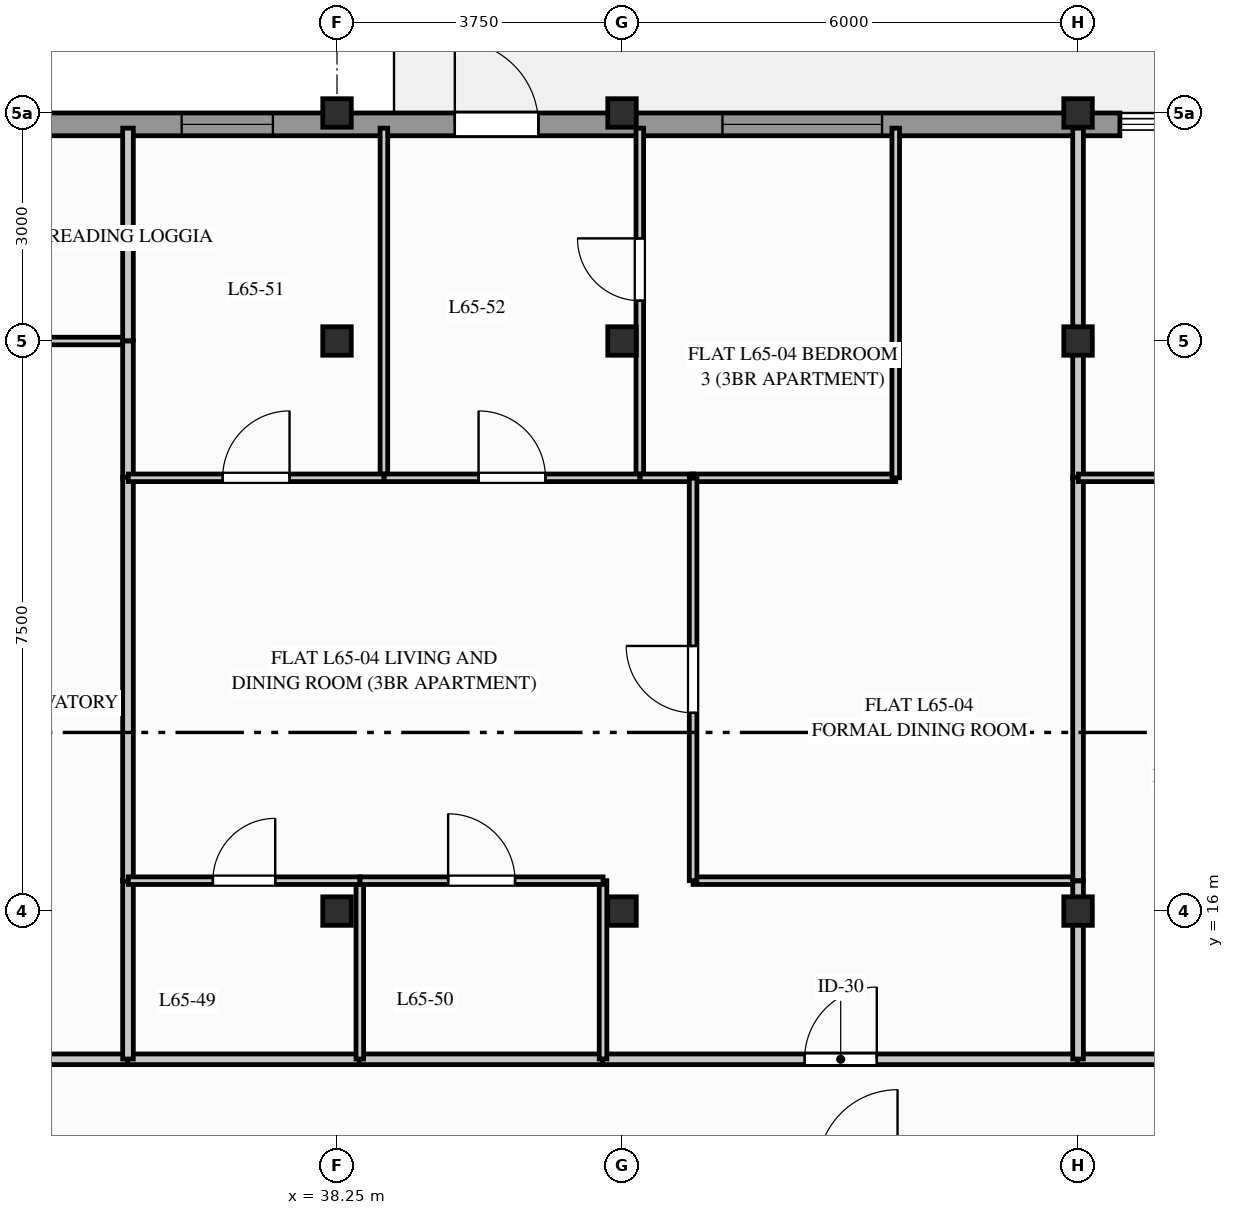
"""IFC4 building model, lengths in metres.
Left out: names, types, materials, properties, quantities, classifications, styles, units other than length and angle.
Written with IfcOpenShell. Run it as: python <this file> out.ifc"""

import sys

from ifc_helpers import new_model, si_unit, direction, frame, frame_2d, origin, origin_2d, place, context, subcontext, project, spatial, rectangle, i_section, extrude, element, fill, save


model = new_model("IFC4")
c1 = context("Model", 3, precision=1e-05, world=origin(), true_north=direction((0.0, 1.0)))
c2 = subcontext(c1, "Body", "Model", "MODEL_VIEW")
j1 = project(units=[si_unit("LENGTHUNIT", "METRE"), si_unit("PLANEANGLEUNIT", "RADIAN")], contexts=[c1])
p1 = place(None, origin())
s1 = spatial("IfcSite", under=j1, at=p1, CompositionType="ELEMENT")
p2 = place(p1, origin())
s2 = spatial("IfcBuilding", under=s1, at=p2, CompositionType="ELEMENT")
p3 = place(p2, frame((0.0, 0.0, 214.4)))
s3 = spatial("IfcBuildingStorey", under=s2, at=p3, CompositionType="ELEMENT", Elevation=214.4)
for number, where, z_axis, x_axis in (
    (1, (38.25, 16.0, 0.0), (0.0, 0.0, 1.0), (1.0, 0.0, 0.0)),
    (2, (38.25, 23.5, 0.0), (0.0, 0.0, 1.0), (1.0, 0.0, 0.0)),
    (3, (38.25, 26.5, 0.0), (0.0, 0.0, 1.0), (1.0, 0.0, 0.0)),
    (4, (42.0, 16.0, 0.0), (0.0, 0.0, 1.0), (1.0, 0.0, 0.0)),
    (5, (42.0, 23.5, 0.0), (0.0, 0.0, 1.0), (1.0, 0.0, 0.0)),
    (6, (42.0, 26.5, 0.0), (0.0, 0.0, 1.0), (1.0, 0.0, 0.0)),
    (7, (48.0, 16.0, 0.0), (0.0, 0.0, 1.0), (1.0, 0.0, 0.0)),
    (8, (48.0, 23.5, 0.0), (0.0, 0.0, 1.0), (1.0, 0.0, 0.0)),
    (9, (48.0, 26.5, 0.0), (0.0, 0.0, 1.0), (1.0, 0.0, 0.0)),
):
    element("IfcColumn", number, at=place(p3, frame(where, z_axis=z_axis, x_axis=x_axis)), inside=s3, PredefinedType="COLUMN", context=c2, shape_type="SweptSolid", body=[
        extrude(i_section(OverallWidth=0.375, OverallDepth=0.375, WebThickness=0.017, FlangeThickness=0.027, FilletRadius=0.015, at=origin_2d()), origin(), (0.0, 0.0, 1.0), 3.6),
    ])
p4 = place(p3, frame((32.2, 26.35, 0.0), z_axis=(0.0, 0.0, 1.0), x_axis=(1.0, 0.0, 0.0)))
e10 = element("IfcWall", 10, at=p4, inside=s3, PredefinedType="STANDARD", context=c2, shape_type="SweptSolid", body=[
    extrude(rectangle(XDim=16.35, YDim=0.3, at=frame_2d((8.175, 0.0))), origin(), (0.0, 0.0, 1.0), 2.454),
])
p5 = place(p4, frame((7.6, 0.0, 0.0)))
e11 = element("IfcOpeningElement", 11, at=p5, cuts=e10, PredefinedType="OPENING", context=c2, shape_type="SweptSolid", body=[
    extrude(rectangle(XDim=1.1, YDim=2.2, at=frame_2d((0.55, 1.1))), frame((0.0, 0.16, 0.0), z_axis=(0.0, -1.0, 0.0), x_axis=(1.0, 0.0, 0.0)), (0.0, 0.0, 1.0), 0.32),
])
p6 = place(p4, frame((11.121, 0.0, 0.284)))
e12 = element("IfcOpeningElement", 12, at=p6, cuts=e10, PredefinedType="OPENING", context=c2, shape_type="SweptSolid", body=[
    extrude(rectangle(XDim=2.1, YDim=1.95, at=frame_2d((1.05, 0.975))), frame((0.0, 0.16, 0.0), z_axis=(0.0, -1.0, 0.0), x_axis=(1.0, 0.0, 0.0)), (0.0, 0.0, 1.0), 0.32),
])
p7 = place(p4, frame((4.006, 0.0, 0.634)))
e13 = element("IfcOpeningElement", 13, at=p7, cuts=e10, PredefinedType="OPENING", context=c2, shape_type="SweptSolid", body=[
    extrude(rectangle(XDim=1.2, YDim=1.6, at=frame_2d((0.6, 0.8))), frame((0.0, 0.16, 0.0), z_axis=(0.0, -1.0, 0.0), x_axis=(1.0, 0.0, 0.0)), (0.0, 0.0, 1.0), 0.32),
])
p8 = place(p3, frame((24.493, 14.05, 0.0), z_axis=(0.0, 0.0, 1.0), x_axis=(1.0, 0.0, 0.0)))
e14 = element("IfcWall", 14, at=p8, inside=s3, PredefinedType="PARTITIONING", context=c2, shape_type="SweptSolid", body=[
    extrude(rectangle(XDim=11.019, YDim=0.14, at=frame_2d((5.509, 0.0))), origin(), (0.0, 0.0, 1.0), 2.685),
])
p9 = place(p8, frame((4.984, 0.0, 0.0)))
e15 = element("IfcOpeningElement", 15, at=p9, cuts=e14, PredefinedType="OPENING", context=c2, shape_type="SweptSolid", body=[
    extrude(rectangle(XDim=1.05, YDim=2.06, at=frame_2d((0.525, 1.03))), frame((0.0, 0.08, 0.0), z_axis=(0.0, -1.0, 0.0), x_axis=(1.0, 0.0, 0.0)), (0.0, 0.0, 1.0), 0.16),
])
p10 = place(p3, frame((35.493, 14.05, 0.0), z_axis=(0.0, 0.0, 1.0), x_axis=(1.0, 0.0, 0.0)))
e16 = element("IfcWall", 16, at=p10, inside=s3, PredefinedType="PARTITIONING", context=c2, shape_type="SweptSolid", body=[
    extrude(rectangle(XDim=3.069, YDim=0.14, at=frame_2d((1.534, 0.0))), origin(), (0.0, 0.0, 1.0), 2.685),
])
p11 = place(p3, frame((38.543, 14.05, 0.0), z_axis=(0.0, 0.0, 1.0), x_axis=(1.0, 0.0, 0.0)))
e17 = element("IfcWall", 17, at=p11, inside=s3, PredefinedType="PARTITIONING", context=c2, shape_type="SweptSolid", body=[
    extrude(rectangle(XDim=3.219, YDim=0.14, at=frame_2d((1.609, 0.0))), origin(), (0.0, 0.0, 1.0), 3.33),
])
p12 = place(p3, frame((41.743, 14.05, 0.0), z_axis=(0.0, 0.0, 1.0), x_axis=(1.0, 0.0, 0.0)))
e18 = element("IfcWall", 18, at=p12, inside=s3, PredefinedType="PARTITIONING", context=c2, shape_type="SweptSolid", body=[
    extrude(rectangle(XDim=6.269, YDim=0.14, at=frame_2d((3.134, 0.0))), origin(), (0.0, 0.0, 1.0), 2.685),
])
p13 = place(p12, frame((2.659, 0.0, 0.0)))
e19 = element("IfcOpeningElement", 19, at=p13, cuts=e18, PredefinedType="OPENING", context=c2, shape_type="SweptSolid", body=[
    extrude(rectangle(XDim=0.95, YDim=2.05, at=frame_2d((0.475, 1.025))), frame((0.0, 0.08, 0.0), z_axis=(0.0, -1.0, 0.0), x_axis=(1.0, 0.0, 0.0)), (0.0, 0.0, 1.0), 0.16),
])
p14 = place(p3, frame((47.993, 14.05, 0.0), z_axis=(0.0, 0.0, 1.0), x_axis=(1.0, 0.0, 0.0)))
e20 = element("IfcWall", 20, at=p14, inside=s3, PredefinedType="PARTITIONING", context=c2, shape_type="SweptSolid", body=[
    extrude(rectangle(XDim=5.565, YDim=0.14, at=frame_2d((2.782, 0.0))), origin(), (0.0, 0.0, 1.0), 2.685),
])
p15 = place(p14, frame((2.307, 0.0, 0.0)))
e21 = element("IfcOpeningElement", 21, at=p15, cuts=e20, PredefinedType="OPENING", context=c2, shape_type="SweptSolid", body=[
    extrude(rectangle(XDim=0.95, YDim=2.05, at=frame_2d((0.475, 1.025))), frame((0.0, 0.08, 0.0), z_axis=(0.0, -1.0, 0.0), x_axis=(1.0, 0.0, 0.0)), (0.0, 0.0, 1.0), 0.16),
])
p16 = place(p3, frame((24.504, 23.5, 0.0), z_axis=(0.0, 0.0, 1.0), x_axis=(1.0, 0.0, 0.0)))
e22 = element("IfcWall", 22, at=p16, inside=s3, PredefinedType="PARTITIONING", context=c2, shape_type="SweptSolid", body=[
    extrude(rectangle(XDim=10.996, YDim=0.1, at=frame_2d((5.498, 0.0))), origin(), (0.0, 0.0, 1.0), 2.454),
])
p17 = place(p16, frame((5.088, 0.0, 0.0)))
e23 = element("IfcOpeningElement", 23, at=p17, cuts=e22, PredefinedType="OPENING", context=c2, shape_type="SweptSolid", body=[
    extrude(rectangle(XDim=0.82, YDim=2.02, at=frame_2d((0.41, 1.01))), frame((0.0, 0.06, 0.0), z_axis=(0.0, -1.0, 0.0), x_axis=(1.0, 0.0, 0.0)), (0.0, 0.0, 1.0), 0.12),
])
p18 = place(p3, frame((35.5, 14.054, 0.0), z_axis=(0.0, 0.0, 1.0), x_axis=(0.0, 1.0, 0.0)))
e24 = element("IfcWall", 24, at=p18, inside=s3, PredefinedType="PARTITIONING", context=c2, shape_type="SweptSolid", body=[
    extrude(rectangle(XDim=2.357, YDim=0.14, at=frame_2d((1.179, 0.0))), origin(), (0.0, 0.0, 1.0), 2.454),
])
p19 = place(p3, frame((35.5, 21.689, 0.0), z_axis=(0.0, 0.0, 1.0), x_axis=(0.0, 1.0, 0.0)))
e25 = element("IfcWall", 25, at=p19, inside=s3, PredefinedType="PARTITIONING", context=c2, shape_type="SweptSolid", body=[
    extrude(rectangle(XDim=1.811, YDim=0.14, at=frame_2d((0.906, 0.0))), origin(), (0.0, 0.0, 1.0), 2.454),
])
p20 = place(p3, frame((35.5, 16.393, 0.0), z_axis=(0.0, 0.0, 1.0), x_axis=(0.0, 1.0, 0.0)))
e26 = element("IfcWall", 26, at=p20, inside=s3, PredefinedType="PARTITIONING", context=c2, shape_type="SweptSolid", body=[
    extrude(rectangle(XDim=5.315, YDim=0.14, at=frame_2d((2.657, 0.0))), origin(), (0.0, 0.0, 1.0), 2.899),
])
p21 = place(p3, frame((35.5, 23.504, 0.0), z_axis=(0.0, 0.0, 1.0), x_axis=(0.0, 1.0, 0.0)))
e27 = element("IfcWall", 27, at=p21, inside=s3, PredefinedType="PARTITIONING", context=c2, shape_type="SweptSolid", body=[
    extrude(rectangle(XDim=2.796, YDim=0.14, at=frame_2d((1.398, 0.0))), origin(), (0.0, 0.0, 1.0), 2.454),
])
p22 = place(p3, frame((38.55, 14.054, 0.0), z_axis=(0.0, 0.0, 1.0), x_axis=(0.0, 1.0, 0.0)))
e28 = element("IfcWall", 28, at=p22, inside=s3, PredefinedType="PARTITIONING", context=c2, shape_type="SweptSolid", body=[
    extrude(rectangle(XDim=2.346, YDim=0.1, at=frame_2d((1.173, 0.0))), origin(), (0.0, 0.0, 1.0), 2.685),
])
p23 = place(p3, frame((35.504, 16.4, 0.0), z_axis=(0.0, 0.0, 1.0), x_axis=(1.0, 0.0, 0.0)))
e29 = element("IfcWall", 29, at=p23, inside=s3, PredefinedType="PARTITIONING", context=c2, shape_type="SweptSolid", body=[
    extrude(rectangle(XDim=3.046, YDim=0.1, at=frame_2d((1.523, 0.0))), origin(), (0.0, 0.0, 1.0), 2.685),
])
p24 = place(p23, frame((1.113, 0.0, 0.0)))
e30 = element("IfcOpeningElement", 30, at=p24, cuts=e29, PredefinedType="OPENING", context=c2, shape_type="SweptSolid", body=[
    extrude(rectangle(XDim=0.82, YDim=2.02, at=frame_2d((0.41, 1.01))), frame((0.0, 0.06, 0.0), z_axis=(0.0, -1.0, 0.0), x_axis=(1.0, 0.0, 0.0)), (0.0, 0.0, 1.0), 0.12),
])
p25 = place(p3, frame((41.75, 14.054, 0.0), z_axis=(0.0, 0.0, 1.0), x_axis=(0.0, 1.0, 0.0)))
e31 = element("IfcWall", 31, at=p25, inside=s3, PredefinedType="PARTITIONING", context=c2, shape_type="SweptSolid", body=[
    extrude(rectangle(XDim=2.346, YDim=0.1, at=frame_2d((1.173, 0.0))), origin(), (0.0, 0.0, 1.0), 2.685),
])
p26 = place(p3, frame((38.554, 16.4, 0.0), z_axis=(0.0, 0.0, 1.0), x_axis=(1.0, 0.0, 0.0)))
e32 = element("IfcWall", 32, at=p26, inside=s3, PredefinedType="PARTITIONING", context=c2, shape_type="SweptSolid", body=[
    extrude(rectangle(XDim=3.196, YDim=0.1, at=frame_2d((1.598, 0.0))), origin(), (0.0, 0.0, 1.0), 3.33),
])
p27 = place(p26, frame((1.158, 0.0, 0.0)))
e33 = element("IfcOpeningElement", 33, at=p27, cuts=e32, PredefinedType="OPENING", context=c2, shape_type="SweptSolid", body=[
    extrude(rectangle(XDim=0.88, YDim=2.04, at=frame_2d((0.44, 1.02))), frame((0.0, 0.06, 0.0), z_axis=(0.0, -1.0, 0.0), x_axis=(1.0, 0.0, 0.0)), (0.0, 0.0, 1.0), 0.12),
])
p28 = place(p3, frame((38.867, 21.7, 0.0), z_axis=(0.0, 0.0, 1.0), x_axis=(0.0, 1.0, 0.0)))
e34 = element("IfcWall", 34, at=p28, inside=s3, PredefinedType="PARTITIONING", context=c2, shape_type="SweptSolid", body=[
    extrude(rectangle(XDim=4.6, YDim=0.1, at=frame_2d((2.3, 0.0))), origin(), (0.0, 0.0, 1.0), 2.685),
])
p29 = place(p3, frame((35.504, 21.7, 0.0), z_axis=(0.0, 0.0, 1.0), x_axis=(1.0, 0.0, 0.0)))
e35 = element("IfcWall", 35, at=p29, inside=s3, PredefinedType="PARTITIONING", context=c2, shape_type="SweptSolid", body=[
    extrude(rectangle(XDim=3.363, YDim=0.1, at=frame_2d((1.682, 0.0))), origin(), (0.0, 0.0, 1.0), 2.685),
])
p30 = place(p29, frame((1.241, 0.0, 0.0)))
e36 = element("IfcOpeningElement", 36, at=p30, cuts=e35, PredefinedType="OPENING", context=c2, shape_type="SweptSolid", body=[
    extrude(rectangle(XDim=0.88, YDim=2.04, at=frame_2d((0.44, 1.02))), frame((0.0, 0.06, 0.0), z_axis=(0.0, -1.0, 0.0), x_axis=(1.0, 0.0, 0.0)), (0.0, 0.0, 1.0), 0.12),
])
p31 = place(p3, frame((42.234, 21.7, 0.0), z_axis=(0.0, 0.0, 1.0), x_axis=(0.0, 1.0, 0.0)))
e37 = element("IfcWall", 37, at=p31, inside=s3, PredefinedType="PARTITIONING", context=c2, shape_type="SweptSolid", body=[
    extrude(rectangle(XDim=4.6, YDim=0.1, at=frame_2d((2.3, 0.0))), origin(), (0.0, 0.0, 1.0), 2.685),
])
p32 = place(p31, frame((2.33, 0.0, 0.0)))
e38 = element("IfcOpeningElement", 38, at=p32, cuts=e37, PredefinedType="OPENING", context=c2, shape_type="SweptSolid", body=[
    extrude(rectangle(XDim=0.82, YDim=2.02, at=frame_2d((0.41, 1.01))), frame((0.0, 0.06, 0.0), z_axis=(0.0, -1.0, 0.0), x_axis=(1.0, 0.0, 0.0)), (0.0, 0.0, 1.0), 0.12),
])
p33 = place(p3, frame((38.871, 21.7, 0.0), z_axis=(0.0, 0.0, 1.0), x_axis=(1.0, 0.0, 0.0)))
e39 = element("IfcWall", 39, at=p33, inside=s3, PredefinedType="PARTITIONING", context=c2, shape_type="SweptSolid", body=[
    extrude(rectangle(XDim=3.363, YDim=0.1, at=frame_2d((1.681, 0.0))), origin(), (0.0, 0.0, 1.0), 2.685),
])
p34 = place(p33, frame((1.241, 0.0, 0.0)))
e40 = element("IfcOpeningElement", 40, at=p34, cuts=e39, PredefinedType="OPENING", context=c2, shape_type="SweptSolid", body=[
    extrude(rectangle(XDim=0.88, YDim=2.04, at=frame_2d((0.44, 1.02))), frame((0.0, 0.06, 0.0), z_axis=(0.0, -1.0, 0.0), x_axis=(1.0, 0.0, 0.0)), (0.0, 0.0, 1.0), 0.12),
])
p35 = place(p3, frame((42.924, 21.7, 0.0), z_axis=(0.0, 0.0, 1.0), x_axis=(1.0, 0.0, 0.0)))
e41 = element("IfcWall", 41, at=p35, inside=s3, PredefinedType="PARTITIONING", context=c2, shape_type="SweptSolid", body=[
    extrude(rectangle(XDim=2.677, YDim=0.1, at=frame_2d((1.339, 0.0))), origin(), (0.0, 0.0, 1.0), 3.33),
])
p36 = place(p3, frame((45.601, 21.7, 0.0), z_axis=(0.0, 0.0, 1.0), x_axis=(0.0, 1.0, 0.0)))
e42 = element("IfcWall", 42, at=p36, inside=s3, PredefinedType="PARTITIONING", context=c2, shape_type="SweptSolid", body=[
    extrude(rectangle(XDim=4.6, YDim=0.1, at=frame_2d((2.3, 0.0))), origin(), (0.0, 0.0, 1.0), 2.685),
])
p37 = place(p3, frame((42.238, 21.7, 0.0), z_axis=(0.0, 0.0, 1.0), x_axis=(1.0, 0.0, 0.0)))
e43 = element("IfcWall", 43, at=p37, inside=s3, PredefinedType="PARTITIONING", context=c2, shape_type="SweptSolid", body=[
    extrude(rectangle(XDim=0.704, YDim=0.1, at=frame_2d((0.352, 0.0))), origin(), (0.0, 0.0, 1.0), 3.33),
])
p38 = place(p3, frame((42.935, 16.4, 0.0), z_axis=(0.0, 0.0, 1.0), x_axis=(1.0, 0.0, 0.0)))
e44 = element("IfcWall", 44, at=p38, inside=s3, PredefinedType="PARTITIONING", context=c2, shape_type="SweptSolid", body=[
    extrude(rectangle(XDim=5.065, YDim=0.1, at=frame_2d((2.532, 0.0))), origin(), (0.0, 0.0, 1.0), 2.685),
])
p39 = place(p3, frame((42.935, 16.4, 0.0), z_axis=(0.0, 0.0, 1.0), x_axis=(0.0, 1.0, 0.0)))
e45 = element("IfcWall", 45, at=p39, inside=s3, PredefinedType="PARTITIONING", context=c2, shape_type="SweptSolid", body=[
    extrude(rectangle(XDim=5.296, YDim=0.1, at=frame_2d((2.648, 0.0))), origin(), (0.0, 0.0, 1.0), 2.899),
])
p40 = place(p39, frame((2.208, 0.0, 0.0)))
e46 = element("IfcOpeningElement", 46, at=p40, cuts=e45, PredefinedType="OPENING", context=c2, shape_type="SweptSolid", body=[
    extrude(rectangle(XDim=0.88, YDim=2.04, at=frame_2d((0.44, 1.02))), frame((0.0, 0.06, 0.0), z_axis=(0.0, -1.0, 0.0), x_axis=(1.0, 0.0, 0.0)), (0.0, 0.0, 1.0), 0.12),
])
p41 = place(p3, frame((48.0, 21.689, 0.0), z_axis=(0.0, 0.0, 1.0), x_axis=(0.0, 1.0, 0.0)))
e47 = element("IfcWall", 47, at=p41, inside=s3, PredefinedType="PARTITIONING", context=c2, shape_type="SweptSolid", body=[
    extrude(rectangle(XDim=4.611, YDim=0.14, at=frame_2d((2.306, 0.0))), origin(), (0.0, 0.0, 1.0), 2.685),
])
p42 = place(p3, frame((48.0, 16.4, 0.0), z_axis=(0.0, 0.0, 1.0), x_axis=(0.0, 1.0, 0.0)))
e48 = element("IfcWall", 48, at=p42, inside=s3, PredefinedType="PARTITIONING", context=c2, shape_type="SweptSolid", body=[
    extrude(rectangle(XDim=5.307, YDim=0.14, at=frame_2d((2.654, 0.0))), origin(), (0.0, 0.0, 1.0), 2.685),
])
p43 = place(p3, frame((48.0, 14.054, 0.0), z_axis=(0.0, 0.0, 1.0), x_axis=(0.0, 1.0, 0.0)))
e49 = element("IfcWall", 49, at=p43, inside=s3, PredefinedType="PARTITIONING", context=c2, shape_type="SweptSolid", body=[
    extrude(rectangle(XDim=2.342, YDim=0.14, at=frame_2d((1.171, 0.0))), origin(), (0.0, 0.0, 1.0), 2.685),
])
p44 = place(p3, frame((48.004, 21.7, 0.0), z_axis=(0.0, 0.0, 1.0), x_axis=(1.0, 0.0, 0.0)))
e50 = element("IfcWall", 50, at=p44, inside=s3, PredefinedType="PARTITIONING", context=c2, shape_type="SweptSolid", body=[
    extrude(rectangle(XDim=3.471, YDim=0.1, at=frame_2d((1.736, 0.0))), origin(), (0.0, 0.0, 1.0), 2.685),
])
p45 = place(p44, frame((1.295, 0.0, 0.0)))
e51 = element("IfcOpeningElement", 51, at=p45, cuts=e50, PredefinedType="OPENING", context=c2, shape_type="SweptSolid", body=[
    extrude(rectangle(XDim=0.88, YDim=2.04, at=frame_2d((0.44, 1.02))), frame((0.0, 0.06, 0.0), z_axis=(0.0, -1.0, 0.0), x_axis=(1.0, 0.0, 0.0)), (0.0, 0.0, 1.0), 0.12),
])
p46 = place(p5, origin())
e52 = element("IfcDoor", 52, at=p46, inside=s3, OperationType="SINGLE_SWING_LEFT", PredefinedType="DOOR", context=c2, shape_type="SweptSolid", body=[
    extrude(rectangle(XDim=1.1, YDim=2.2, at=frame_2d((0.55, 1.1))), frame((0.0, 0.025, 0.0), z_axis=(0.0, -1.0, 0.0), x_axis=(1.0, 0.0, 0.0)), (0.0, 0.0, 1.0), 0.05),
])
fill(e11, e52)
p47 = place(p6, origin())
e53 = element("IfcWindow", 53, at=p47, inside=s3, PartitioningType="SINGLE_PANEL", PredefinedType="WINDOW", context=c2, shape_type="SweptSolid", body=[
    extrude(rectangle(XDim=2.1, YDim=1.95, at=frame_2d((1.05, 0.975))), frame((0.0, 0.03, 0.0), z_axis=(0.0, -1.0, 0.0), x_axis=(1.0, 0.0, 0.0)), (0.0, 0.0, 1.0), 0.06),
])
fill(e12, e53)
p48 = place(p13, origin())
e54 = element("IfcDoor", 54, at=p48, inside=s3, OperationType="SINGLE_SWING_RIGHT", PredefinedType="DOOR", context=c2, shape_type="SweptSolid", body=[
    extrude(rectangle(XDim=0.95, YDim=2.05, at=frame_2d((0.475, 1.025))), frame((0.0, 0.025, 0.0), z_axis=(0.0, -1.0, 0.0), x_axis=(1.0, 0.0, 0.0)), (0.0, 0.0, 1.0), 0.05),
])
fill(e19, e54)
p49 = place(p24, origin())
e55 = element("IfcDoor", 55, at=p49, inside=s3, OperationType="SINGLE_SWING_RIGHT", PredefinedType="DOOR", context=c2, shape_type="SweptSolid", body=[
    extrude(rectangle(XDim=0.82, YDim=2.02, at=frame_2d((0.41, 1.01))), frame((0.0, 0.025, 0.0), z_axis=(0.0, -1.0, 0.0), x_axis=(1.0, 0.0, 0.0)), (0.0, 0.0, 1.0), 0.05),
])
fill(e30, e55)
p50 = place(p27, origin())
e56 = element("IfcDoor", 56, at=p50, inside=s3, OperationType="SINGLE_SWING_LEFT", PredefinedType="DOOR", context=c2, shape_type="SweptSolid", body=[
    extrude(rectangle(XDim=0.88, YDim=2.04, at=frame_2d((0.44, 1.02))), frame((0.0, 0.025, 0.0), z_axis=(0.0, -1.0, 0.0), x_axis=(1.0, 0.0, 0.0)), (0.0, 0.0, 1.0), 0.05),
])
fill(e33, e56)
p51 = place(p30, origin())
e57 = element("IfcDoor", 57, at=p51, inside=s3, OperationType="SINGLE_SWING_RIGHT", PredefinedType="DOOR", context=c2, shape_type="SweptSolid", body=[
    extrude(rectangle(XDim=0.88, YDim=2.04, at=frame_2d((0.44, 1.02))), frame((0.0, 0.025, 0.0), z_axis=(0.0, -1.0, 0.0), x_axis=(1.0, 0.0, 0.0)), (0.0, 0.0, 1.0), 0.05),
])
fill(e36, e57)
p52 = place(p34, origin())
e58 = element("IfcDoor", 58, at=p52, inside=s3, OperationType="SINGLE_SWING_LEFT", PredefinedType="DOOR", context=c2, shape_type="SweptSolid", body=[
    extrude(rectangle(XDim=0.88, YDim=2.04, at=frame_2d((0.44, 1.02))), frame((0.0, 0.025, 0.0), z_axis=(0.0, -1.0, 0.0), x_axis=(1.0, 0.0, 0.0)), (0.0, 0.0, 1.0), 0.05),
])
fill(e40, e58)
p53 = place(p40, origin())
e59 = element("IfcDoor", 59, at=p53, inside=s3, OperationType="SINGLE_SWING_RIGHT", PredefinedType="DOOR", context=c2, shape_type="SweptSolid", body=[
    extrude(rectangle(XDim=0.88, YDim=2.04, at=frame_2d((0.44, 1.02))), frame((0.0, 0.025, 0.0), z_axis=(0.0, -1.0, 0.0), x_axis=(1.0, 0.0, 0.0)), (0.0, 0.0, 1.0), 0.05),
])
fill(e46, e59)
p54 = place(p32, origin())
e60 = element("IfcDoor", 60, at=p54, inside=s3, OperationType="SINGLE_SWING_RIGHT", PredefinedType="DOOR", context=c2, shape_type="SweptSolid", body=[
    extrude(rectangle(XDim=0.82, YDim=2.02, at=frame_2d((0.41, 1.01))), frame((0.0, 0.025, 0.0), z_axis=(0.0, -1.0, 0.0), x_axis=(1.0, 0.0, 0.0)), (0.0, 0.0, 1.0), 0.05),
])
fill(e38, e60)
p55 = place(p7, origin())
e61 = element("IfcWindow", 61, at=p55, inside=s3, PartitioningType="SINGLE_PANEL", PredefinedType="WINDOW", context=c2, shape_type="SweptSolid", body=[
    extrude(rectangle(XDim=1.2, YDim=1.6, at=frame_2d((0.6, 0.8))), frame((0.0, 0.03, 0.0), z_axis=(0.0, -1.0, 0.0), x_axis=(1.0, 0.0, 0.0)), (0.0, 0.0, 1.0), 0.06),
])
fill(e13, e61)
save(model, sys.argv[1])
